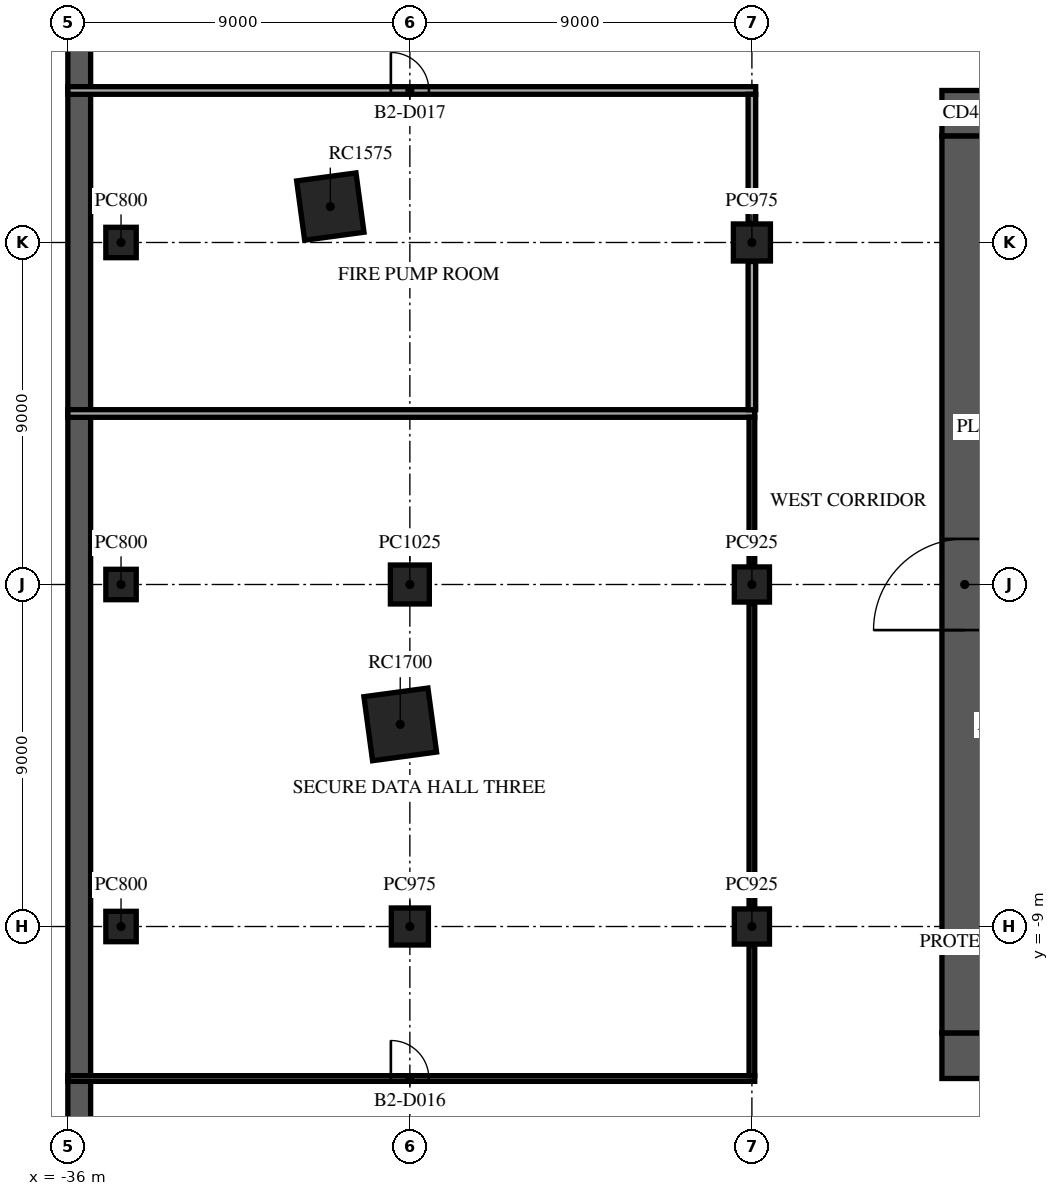
"""IFC4 building model, lengths in metres.
Left out: names, types, materials, properties, quantities, classifications, styles, units other than length and angle.
Written with IfcOpenShell. Run it as: python <this file> out.ifc"""

import sys

from ifc_helpers import new_model, si_unit, direction, frame, frame_2d, origin, origin_2d, place, context, subcontext, project, spatial, rectangle, extrude, element, fill, save


model = new_model("IFC4")
c1 = context("Model", 3, precision=1e-05, world=origin(), true_north=direction((0.0, 1.0)))
c2 = subcontext(c1, "Body", "Model", "MODEL_VIEW")
j1 = project(units=[si_unit("LENGTHUNIT", "METRE"), si_unit("PLANEANGLEUNIT", "RADIAN")], contexts=[c1])
p1 = place(None, origin())
s1 = spatial("IfcSite", under=j1, at=p1, CompositionType="ELEMENT")
p2 = place(p1, origin())
s2 = spatial("IfcBuilding", under=s1, at=p2, CompositionType="ELEMENT")
p3 = place(p2, frame((0.0, 0.0, -9.0)))
s3 = spatial("IfcBuildingStorey", under=s2, at=p3, CompositionType="ELEMENT", Elevation=-9.0)
p4 = place(p3, frame((-35.7, 31.0, -0.3), z_axis=(0.0, 0.0, 1.0), x_axis=(0.0, -1.0, 0.0)))
e1 = element("IfcWall", 1, at=p4, inside=s3, PredefinedType="SOLIDWALL", context=c2, shape_type="SweptSolid", body=[
    extrude(rectangle(XDim=62.0, YDim=0.6, at=frame_2d((31.0, 0.0))), origin(), (0.0, 0.0, 1.0), 4.5),
])
for number, where, z_axis, x_axis in (
    (2, (-34.6, -9.0, -0.3), (0.0, 0.0, 1.0), (1.0, 0.0, 0.0)),
    (3, (-34.6, 0.0, -0.3), (0.0, 0.0, 1.0), (1.0, 0.0, 0.0)),
    (4, (-34.6, 9.0, -0.3), (0.0, 0.0, 1.0), (1.0, 0.0, 0.0)),
):
    element("IfcColumn", number, at=place(p3, frame(where, z_axis=z_axis, x_axis=x_axis)), inside=s3, PredefinedType="COLUMN", context=c2, shape_type="SweptSolid", body=[
        extrude(rectangle(XDim=0.8, YDim=0.8, at=origin_2d()), origin(), (0.0, 0.0, 1.0), 4.8),
    ])
p5 = place(p3, frame((-27.0, -9.0, -0.3), z_axis=(0.0, 0.0, 1.0), x_axis=(1.0, 0.0, 0.0)))
e5 = element("IfcColumn", 5, at=p5, inside=s3, PredefinedType="COLUMN", context=c2, shape_type="SweptSolid", body=[
    extrude(rectangle(XDim=0.975, YDim=0.975, at=origin_2d()), origin(), (0.0, 0.0, 1.0), 4.8),
])
p6 = place(p3, frame((-27.0, 0.0, -0.3), z_axis=(0.0, 0.0, 1.0), x_axis=(1.0, 0.0, 0.0)))
e6 = element("IfcColumn", 6, at=p6, inside=s3, PredefinedType="COLUMN", context=c2, shape_type="SweptSolid", body=[
    extrude(rectangle(XDim=1.025, YDim=1.025, at=origin_2d()), origin(), (0.0, 0.0, 1.0), 4.8),
])
for number, where, z_axis, x_axis in (
    (7, (-18.0, -9.0, -0.3), (0.0, 0.0, 1.0), (1.0, 0.0, 0.0)),
    (8, (-18.0, 0.0, -0.3), (0.0, 0.0, 1.0), (1.0, 0.0, 0.0)),
):
    element("IfcColumn", number, at=place(p3, frame(where, z_axis=z_axis, x_axis=x_axis)), inside=s3, PredefinedType="COLUMN", context=c2, shape_type="SweptSolid", body=[
        extrude(rectangle(XDim=0.925, YDim=0.925, at=origin_2d()), origin(), (0.0, 0.0, 1.0), 4.8),
    ])
p7 = place(p3, frame((-18.0, 9.0, -0.3), z_axis=(0.0, 0.0, 1.0), x_axis=(1.0, 0.0, 0.0)))
e9 = element("IfcColumn", 9, at=p7, inside=s3, PredefinedType="COLUMN", context=c2, shape_type="SweptSolid", body=[
    extrude(rectangle(XDim=0.975, YDim=0.975, at=origin_2d()), origin(), (0.0, 0.0, 1.0), 4.8),
])
p8 = place(p3, frame((-29.093, 9.945, -0.3), z_axis=(0.0, 0.0, 1.0), x_axis=(0.991001197216, 0.133853005627, 0.0)))
e10 = element("IfcColumn", 10, at=p8, inside=s3, PredefinedType="COLUMN", context=c2, shape_type="SweptSolid", body=[
    extrude(rectangle(XDim=1.575, YDim=1.575, at=origin_2d()), origin(), (0.0, 0.0, 1.0), 4.8),
])
p9 = place(p3, frame((-27.253, -3.681, -0.3), z_axis=(0.0, 0.0, 1.0), x_axis=(0.991001197216, 0.133853005627, 0.0)))
e11 = element("IfcColumn", 11, at=p9, inside=s3, PredefinedType="COLUMN", context=c2, shape_type="SweptSolid", body=[
    extrude(rectangle(XDim=1.7, YDim=1.7, at=origin_2d()), origin(), (0.0, 0.0, 1.0), 4.8),
])
p10 = place(p3, frame((-13.0, 12.4, 0.0), z_axis=(0.0, 0.0, 1.0), x_axis=(1.0, 0.0, 0.0)))
e12 = element("IfcWall", 12, at=p10, inside=s3, PredefinedType="SHEAR", context=c2, shape_type="SweptSolid", body=[
    extrude(rectangle(XDim=26.0, YDim=1.2, at=frame_2d((13.0, 0.0))), origin(), (0.0, 0.0, 1.0), 4.2),
])
p11 = place(p10, frame((11.8, 0.0, 0.0)))
e13 = element("IfcOpeningElement", 13, at=p11, cuts=e12, PredefinedType="OPENING", context=c2, shape_type="SweptSolid", body=[
    extrude(rectangle(XDim=2.4, YDim=2.4, at=frame_2d((1.2, 1.2))), frame((0.0, 0.61, 0.0), z_axis=(0.0, -1.0, 0.0), x_axis=(1.0, 0.0, 0.0)), (0.0, 0.0, 1.0), 1.22),
])
p12 = place(p10, frame((22.625, 0.0, 0.0)))
e14 = element("IfcOpeningElement", 14, at=p12, cuts=e12, PredefinedType="OPENING", context=c2, shape_type="SweptSolid", body=[
    extrude(rectangle(XDim=1.2, YDim=2.1, at=frame_2d((0.6, 1.05))), frame((0.0, 0.61, 0.0), z_axis=(0.0, -1.0, 0.0), x_axis=(1.0, 0.0, 0.0)), (0.0, 0.0, 1.0), 1.22),
])
p13 = place(p10, frame((1.6, 0.0, 0.0)))
e15 = element("IfcOpeningElement", 15, at=p13, cuts=e12, PredefinedType="OPENING", context=c2, shape_type="SweptSolid", body=[
    extrude(rectangle(XDim=1.0, YDim=2.1, at=frame_2d((0.5, 1.05))), frame((0.0, 0.61, 0.0), z_axis=(0.0, -1.0, 0.0), x_axis=(1.0, 0.0, 0.0)), (0.0, 0.0, 1.0), 1.22),
])
p14 = place(p3, frame((-13.0, -12.4, 0.0), z_axis=(0.0, 0.0, 1.0), x_axis=(1.0, 0.0, 0.0)))
e16 = element("IfcWall", 16, at=p14, inside=s3, PredefinedType="SHEAR", context=c2, shape_type="SweptSolid", body=[
    extrude(rectangle(XDim=26.0, YDim=1.2, at=frame_2d((13.0, 0.0))), origin(), (0.0, 0.0, 1.0), 4.2),
])
p15 = place(p14, frame((7.9, 0.0, 0.0)))
e17 = element("IfcOpeningElement", 17, at=p15, cuts=e16, PredefinedType="OPENING", context=c2, shape_type="SweptSolid", body=[
    extrude(rectangle(XDim=2.0, YDim=2.1, at=frame_2d((1.0, 1.05))), frame((0.0, 0.61, 0.0), z_axis=(0.0, -1.0, 0.0), x_axis=(1.0, 0.0, 0.0)), (0.0, 0.0, 1.0), 1.22),
])
p16 = place(p14, frame((18.025, 0.0, 0.0)))
e18 = element("IfcOpeningElement", 18, at=p16, cuts=e16, PredefinedType="OPENING", context=c2, shape_type="SweptSolid", body=[
    extrude(rectangle(XDim=1.2, YDim=2.1, at=frame_2d((0.6, 1.05))), frame((0.0, 0.61, 0.0), z_axis=(0.0, -1.0, 0.0), x_axis=(1.0, 0.0, 0.0)), (0.0, 0.0, 1.0), 1.22),
])
p17 = place(p14, frame((2.175, 0.0, 0.0)))
e19 = element("IfcOpeningElement", 19, at=p17, cuts=e16, PredefinedType="OPENING", context=c2, shape_type="SweptSolid", body=[
    extrude(rectangle(XDim=1.2, YDim=2.1, at=frame_2d((0.6, 1.05))), frame((0.0, 0.61, 0.0), z_axis=(0.0, -1.0, 0.0), x_axis=(1.0, 0.0, 0.0)), (0.0, 0.0, 1.0), 1.22),
])
p18 = place(p14, frame((22.625, 0.0, 0.0)))
e20 = element("IfcOpeningElement", 20, at=p18, cuts=e16, PredefinedType="OPENING", context=c2, shape_type="SweptSolid", body=[
    extrude(rectangle(XDim=1.2, YDim=2.1, at=frame_2d((0.6, 1.05))), frame((0.0, 0.61, 0.0), z_axis=(0.0, -1.0, 0.0), x_axis=(1.0, 0.0, 0.0)), (0.0, 0.0, 1.0), 1.22),
])
p19 = place(p3, frame((-12.4, -11.8, 0.0), z_axis=(0.0, 0.0, 1.0), x_axis=(0.0, 1.0, 0.0)))
e21 = element("IfcWall", 21, at=p19, inside=s3, PredefinedType="SHEAR", context=c2, shape_type="SweptSolid", body=[
    extrude(rectangle(XDim=23.6, YDim=1.2, at=frame_2d((11.8, 0.0))), origin(), (0.0, 0.0, 1.0), 4.2),
])
p20 = place(p19, frame((10.6, 0.0, 0.0)))
e22 = element("IfcOpeningElement", 22, at=p20, cuts=e21, PredefinedType="OPENING", context=c2, shape_type="SweptSolid", body=[
    extrude(rectangle(XDim=2.4, YDim=2.4, at=frame_2d((1.2, 1.2))), frame((0.0, 0.61, 0.0), z_axis=(0.0, -1.0, 0.0), x_axis=(1.0, 0.0, 0.0)), (0.0, 0.0, 1.0), 1.22),
])
p21 = place(p3, frame((-36.0, -13.0, 0.0), z_axis=(0.0, 0.0, 1.0), x_axis=(1.0, 0.0, 0.0)))
e23 = element("IfcWall", 23, at=p21, inside=s3, PredefinedType="PARTITIONING", context=c2, shape_type="SweptSolid", body=[
    extrude(rectangle(XDim=18.075, YDim=0.15, at=frame_2d((9.038, 0.0))), origin(), (0.0, 0.0, 1.0), 4.2),
])
p22 = place(p21, frame((8.5, 0.0, 0.0)))
e24 = element("IfcOpeningElement", 24, at=p22, cuts=e23, PredefinedType="OPENING", context=c2, shape_type="SweptSolid", body=[
    extrude(rectangle(XDim=1.0, YDim=2.1, at=frame_2d((0.5, 1.05))), frame((0.0, 0.085, 0.0), z_axis=(0.0, -1.0, 0.0), x_axis=(1.0, 0.0, 0.0)), (0.0, 0.0, 1.0), 0.17),
])
p23 = place(p3, frame((-36.0, 4.5, 0.0), z_axis=(0.0, 0.0, 1.0), x_axis=(1.0, 0.0, 0.0)))
e25 = element("IfcWall", 25, at=p23, inside=s3, PredefinedType="PARTITIONING", context=c2, shape_type="SweptSolid", body=[
    extrude(rectangle(XDim=18.075, YDim=0.2, at=frame_2d((9.038, 0.0))), origin(), (0.0, 0.0, 1.0), 4.2),
])
p24 = place(p3, frame((-36.0, 13.0, 0.0), z_axis=(0.0, 0.0, 1.0), x_axis=(1.0, 0.0, 0.0)))
e26 = element("IfcWall", 26, at=p24, inside=s3, PredefinedType="PARTITIONING", context=c2, shape_type="SweptSolid", body=[
    extrude(rectangle(XDim=18.1, YDim=0.2, at=frame_2d((9.05, 0.0))), origin(), (0.0, 0.0, 1.0), 4.2),
])
p25 = place(p24, frame((8.5, 0.0, 0.0)))
e27 = element("IfcOpeningElement", 27, at=p25, cuts=e26, PredefinedType="OPENING", context=c2, shape_type="SweptSolid", body=[
    extrude(rectangle(XDim=1.0, YDim=2.1, at=frame_2d((0.5, 1.05))), frame((0.0, 0.11, 0.0), z_axis=(0.0, -1.0, 0.0), x_axis=(1.0, 0.0, 0.0)), (0.0, 0.0, 1.0), 0.22),
])
p26 = place(p3, frame((-18.0, -12.925, 0.0), z_axis=(0.0, 0.0, 1.0), x_axis=(0.0, 1.0, 0.0)))
e28 = element("IfcWall", 28, at=p26, inside=s3, PredefinedType="PARTITIONING", context=c2, shape_type="SweptSolid", body=[
    extrude(rectangle(XDim=3.425, YDim=0.15, at=frame_2d((1.712, 0.0))), origin(), (0.0, 0.0, 1.0), 4.2),
])
p27 = place(p3, frame((-18.0, -8.5, 0.0), z_axis=(0.0, 0.0, 1.0), x_axis=(0.0, 1.0, 0.0)))
e29 = element("IfcWall", 29, at=p27, inside=s3, PredefinedType="PARTITIONING", context=c2, shape_type="SweptSolid", body=[
    extrude(rectangle(XDim=8.0, YDim=0.15, at=frame_2d((4.0, 0.0))), origin(), (0.0, 0.0, 1.0), 4.2),
])
p28 = place(p3, frame((-18.0, 0.5, 0.0), z_axis=(0.0, 0.0, 1.0), x_axis=(0.0, 1.0, 0.0)))
e30 = element("IfcWall", 30, at=p28, inside=s3, PredefinedType="PARTITIONING", context=c2, shape_type="SweptSolid", body=[
    extrude(rectangle(XDim=3.9, YDim=0.15, at=frame_2d((1.95, 0.0))), origin(), (0.0, 0.0, 1.0), 4.2),
])
p29 = place(p3, frame((-18.0, 4.6, 0.0), z_axis=(0.0, 0.0, 1.0), x_axis=(0.0, 1.0, 0.0)))
e31 = element("IfcWall", 31, at=p29, inside=s3, PredefinedType="PARTITIONING", context=c2, shape_type="SweptSolid", body=[
    extrude(rectangle(XDim=3.9, YDim=0.2, at=frame_2d((1.95, 0.0))), origin(), (0.0, 0.0, 1.0), 4.2),
])
p30 = place(p3, frame((-18.0, 9.5, 0.0), z_axis=(0.0, 0.0, 1.0), x_axis=(0.0, 1.0, 0.0)))
e32 = element("IfcWall", 32, at=p30, inside=s3, PredefinedType="PARTITIONING", context=c2, shape_type="SweptSolid", body=[
    extrude(rectangle(XDim=3.4, YDim=0.2, at=frame_2d((1.7, 0.0))), origin(), (0.0, 0.0, 1.0), 4.2),
])
p31 = place(p20, origin())
e33 = element("IfcDoor", 33, at=p31, inside=s3, OperationType="SINGLE_SWING_LEFT", PredefinedType="DOOR", context=c2, shape_type="SweptSolid", body=[
    extrude(rectangle(XDim=2.4, YDim=2.4, at=frame_2d((1.2, 1.2))), frame((0.0, 0.025, 0.0), z_axis=(0.0, -1.0, 0.0), x_axis=(1.0, 0.0, 0.0)), (0.0, 0.0, 1.0), 0.05),
])
fill(e22, e33)
p32 = place(p22, origin())
e34 = element("IfcDoor", 34, at=p32, inside=s3, OperationType="SINGLE_SWING_RIGHT", PredefinedType="DOOR", context=c2, shape_type="SweptSolid", body=[
    extrude(rectangle(XDim=1.0, YDim=2.1, at=frame_2d((0.5, 1.05))), frame((0.0, 0.025, 0.0), z_axis=(0.0, -1.0, 0.0), x_axis=(1.0, 0.0, 0.0)), (0.0, 0.0, 1.0), 0.05),
])
fill(e24, e34)
p33 = place(p25, origin())
e35 = element("IfcDoor", 35, at=p33, inside=s3, OperationType="SINGLE_SWING_LEFT", PredefinedType="DOOR", context=c2, shape_type="SweptSolid", body=[
    extrude(rectangle(XDim=1.0, YDim=2.1, at=frame_2d((0.5, 1.05))), frame((0.0, 0.025, 0.0), z_axis=(0.0, -1.0, 0.0), x_axis=(1.0, 0.0, 0.0)), (0.0, 0.0, 1.0), 0.05),
])
fill(e27, e35)
save(model, sys.argv[1])
